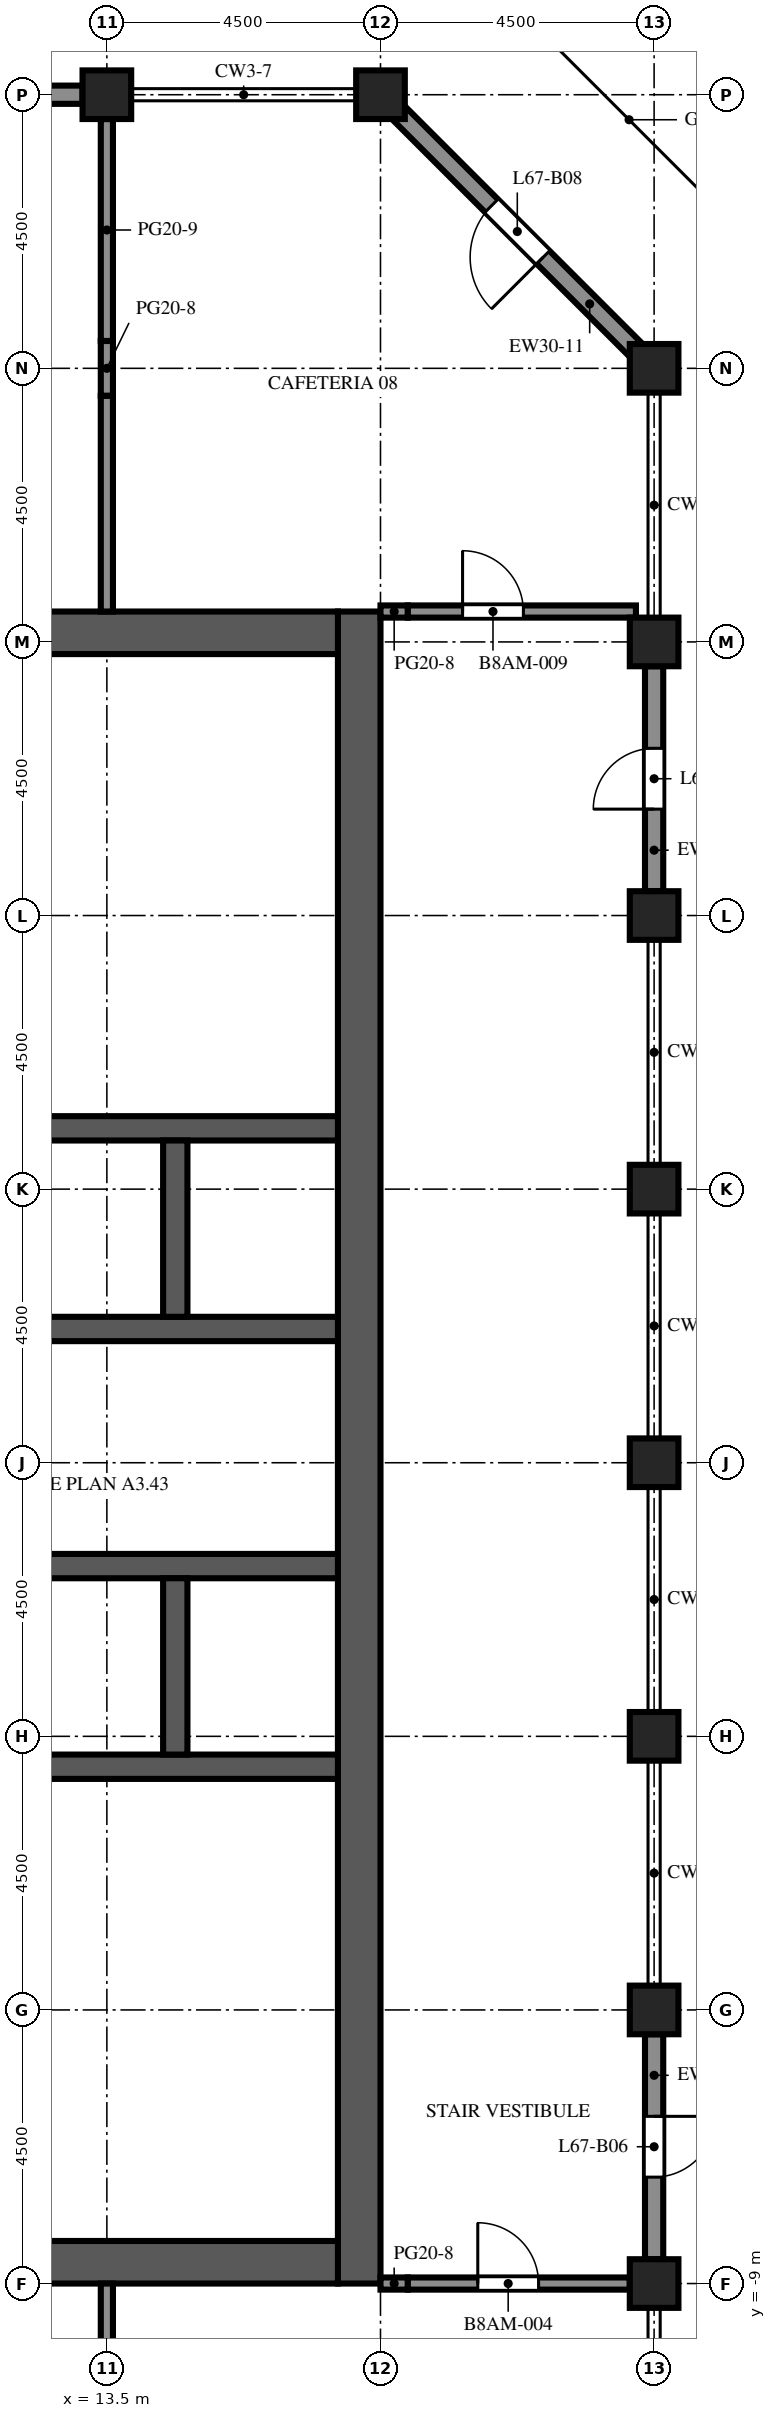
"""IFC4 building model, lengths in metres.
Left out: names, types, materials, properties, quantities, classifications, styles, units other than length and angle.
Written with IfcOpenShell. Run it as: python <this file> out.ifc"""

import sys

from ifc_helpers import new_model, si_unit, direction, frame, frame_2d, origin, origin_2d, place, context, subcontext, project, spatial, rectangle, extrude, element, fill, save


model = new_model("IFC4")
c1 = context("Model", 3, precision=1e-05, world=origin(), true_north=direction((0.0, 1.0)))
c2 = subcontext(c1, "Body", "Model", "MODEL_VIEW")
j1 = project(units=[si_unit("LENGTHUNIT", "METRE"), si_unit("PLANEANGLEUNIT", "RADIAN")], contexts=[c1])
p1 = place(None, origin())
s1 = spatial("IfcSite", under=j1, at=p1, CompositionType="ELEMENT")
p2 = place(p1, origin())
s2 = spatial("IfcBuilding", under=s1, at=p2, CompositionType="ELEMENT")
p3 = place(p2, frame((0.0, 0.0, 295.0)))
s3 = spatial("IfcBuildingStorey", under=s2, at=p3, CompositionType="ELEMENT", Elevation=295.0)
p4 = place(p3, frame((13.5, 27.0, 0.0), z_axis=(0.0, 0.0, 1.0), x_axis=(1.0, 0.0, 0.0)))
e1 = element("IfcColumn", 1, at=p4, inside=s3, PredefinedType="COLUMN", context=c2, shape_type="SweptSolid", body=[
    extrude(rectangle(XDim=0.8, YDim=0.8, at=origin_2d()), origin(), (0.0, 0.0, 1.0), 6.0),
])
p5 = place(p3, frame((18.0, 27.0, 0.0), z_axis=(0.0, 0.0, 1.0), x_axis=(1.0, 0.0, 0.0)))
e2 = element("IfcColumn", 2, at=p5, inside=s3, PredefinedType="COLUMN", context=c2, shape_type="SweptSolid", body=[
    extrude(rectangle(XDim=0.8, YDim=0.8, at=origin_2d()), origin(), (0.0, 0.0, 1.0), 3.6),
])
for number, where, z_axis, x_axis in (
    (3, (22.5, -9.0, 0.0), (0.0, 0.0, 1.0), (1.0, 0.0, 0.0)),
    (4, (22.5, -4.5, 0.0), (0.0, 0.0, 1.0), (1.0, 0.0, 0.0)),
    (5, (22.5, 0.0, 0.0), (0.0, 0.0, 1.0), (1.0, 0.0, 0.0)),
    (6, (22.5, 4.5, 0.0), (0.0, 0.0, 1.0), (1.0, 0.0, 0.0)),
    (7, (22.5, 9.0, 0.0), (0.0, 0.0, 1.0), (1.0, 0.0, 0.0)),
    (8, (22.5, 13.5, 0.0), (0.0, 0.0, 1.0), (1.0, 0.0, 0.0)),
    (9, (22.5, 18.0, 0.0), (0.0, 0.0, 1.0), (1.0, 0.0, 0.0)),
    (10, (22.5, 22.5, 0.0), (0.0, 0.0, 1.0), (1.0, 0.0, 0.0)),
):
    element("IfcColumn", number, at=place(p3, frame(where, z_axis=z_axis, x_axis=x_axis)), inside=s3, PredefinedType="COLUMN", context=c2, shape_type="SweptSolid", body=[
        extrude(rectangle(XDim=0.8, YDim=0.8, at=origin_2d()), origin(), (0.0, 0.0, 1.0), 6.0),
    ])
p6 = place(p3, frame((17.65, -9.0, 0.0), z_axis=(0.0, 0.0, 1.0), x_axis=(0.0, 1.0, 0.0)))
e11 = element("IfcWall", 11, at=p6, inside=s3, PredefinedType="SHEAR", context=c2, shape_type="SweptSolid", body=[
    extrude(rectangle(XDim=27.5, YDim=0.7, at=frame_2d((13.75, 0.0))), origin(), (0.0, 0.0, 1.0), 6.0),
])
p7 = place(p6, frame((12.55, 0.0, 0.0)))
e12 = element("IfcOpeningElement", 12, at=p7, cuts=e11, PredefinedType="OPENING", context=c2, shape_type="SweptSolid", body=[
    extrude(rectangle(XDim=2.4, YDim=2.4, at=frame_2d((1.2, 1.2))), frame((0.0, 0.36, 0.0), z_axis=(0.0, -1.0, 0.0), x_axis=(1.0, 0.0, 0.0)), (0.0, 0.0, 1.0), 0.72),
])
p8 = place(p6, frame((6.825, 0.0, 0.0)))
e13 = element("IfcOpeningElement", 13, at=p8, cuts=e11, PredefinedType="OPENING", context=c2, shape_type="SweptSolid", body=[
    extrude(rectangle(XDim=1.2, YDim=2.1, at=frame_2d((0.6, 1.05))), frame((0.0, 0.36, 0.0), z_axis=(0.0, -1.0, 0.0), x_axis=(1.0, 0.0, 0.0)), (0.0, 0.0, 1.0), 0.72),
])
p9 = place(p6, frame((19.475, 0.0, 0.0)))
e14 = element("IfcOpeningElement", 14, at=p9, cuts=e11, PredefinedType="OPENING", context=c2, shape_type="SweptSolid", body=[
    extrude(rectangle(XDim=1.2, YDim=2.1, at=frame_2d((0.6, 1.05))), frame((0.0, 0.36, 0.0), z_axis=(0.0, -1.0, 0.0), x_axis=(1.0, 0.0, 0.0)), (0.0, 0.0, 1.0), 0.72),
])
for number, where, z_axis, x_axis in (
    (15, (6.7, -8.65, 0.0), (0.0, 0.0, 1.0), (1.0, 0.0, 0.0)),
    (16, (6.7, 18.15, 0.0), (0.0, 0.0, 1.0), (1.0, 0.0, 0.0)),
):
    element("IfcWall", number, at=place(p3, frame(where, z_axis=z_axis, x_axis=x_axis)), inside=s3, PredefinedType="SHEAR", context=c2, shape_type="SweptSolid", body=[
        extrude(rectangle(XDim=10.6, YDim=0.7, at=frame_2d((5.3, 0.0))), origin(), (0.0, 0.0, 1.0), 6.0),
    ])
p10 = place(p3, frame((6.7, -0.5, 0.0), z_axis=(0.0, 0.0, 1.0), x_axis=(1.0, 0.0, 0.0)))
e17 = element("IfcWall", 17, at=p10, inside=s3, PredefinedType="SHEAR", context=c2, shape_type="SweptSolid", body=[
    extrude(rectangle(XDim=10.6, YDim=0.4, at=frame_2d((5.3, 0.0))), origin(), (0.0, 0.0, 1.0), 6.0),
])
p11 = place(p3, frame((6.7, 2.8, 0.0), z_axis=(0.0, 0.0, 1.0), x_axis=(1.0, 0.0, 0.0)))
e18 = element("IfcWall", 18, at=p11, inside=s3, PredefinedType="SHEAR", context=c2, shape_type="SweptSolid", body=[
    extrude(rectangle(XDim=10.6, YDim=0.4, at=frame_2d((5.3, 0.0))), origin(), (0.0, 0.0, 1.0), 6.0),
])
p12 = place(p11, frame((0.688, 0.0, 0.0)))
e19 = element("IfcOpeningElement", 19, at=p12, cuts=e18, PredefinedType="OPENING", context=c2, shape_type="SweptSolid", body=[
    extrude(rectangle(XDim=1.1, YDim=2.1, at=frame_2d((0.55, 1.05))), frame((0.0, 0.21, 0.0), z_axis=(0.0, -1.0, 0.0), x_axis=(1.0, 0.0, 0.0)), (0.0, 0.0, 1.0), 0.42),
])
p13 = place(p11, frame((3.438, 0.0, 0.0)))
e20 = element("IfcOpeningElement", 20, at=p13, cuts=e18, PredefinedType="OPENING", context=c2, shape_type="SweptSolid", body=[
    extrude(rectangle(XDim=1.1, YDim=2.1, at=frame_2d((0.55, 1.05))), frame((0.0, 0.21, 0.0), z_axis=(0.0, -1.0, 0.0), x_axis=(1.0, 0.0, 0.0)), (0.0, 0.0, 1.0), 0.42),
])
p14 = place(p11, frame((6.113, 0.0, 0.0)))
e21 = element("IfcOpeningElement", 21, at=p14, cuts=e18, PredefinedType="OPENING", context=c2, shape_type="SweptSolid", body=[
    extrude(rectangle(XDim=1.0, YDim=2.1, at=frame_2d((0.5, 1.05))), frame((0.0, 0.21, 0.0), z_axis=(0.0, -1.0, 0.0), x_axis=(1.0, 0.0, 0.0)), (0.0, 0.0, 1.0), 0.42),
])
p15 = place(p11, frame((8.863, 0.0, 0.0)))
e22 = element("IfcOpeningElement", 22, at=p15, cuts=e18, PredefinedType="OPENING", context=c2, shape_type="SweptSolid", body=[
    extrude(rectangle(XDim=1.0, YDim=2.1, at=frame_2d((0.5, 1.05))), frame((0.0, 0.21, 0.0), z_axis=(0.0, -1.0, 0.0), x_axis=(1.0, 0.0, 0.0)), (0.0, 0.0, 1.0), 0.42),
])
p16 = place(p3, frame((6.7, 6.7, 0.0), z_axis=(0.0, 0.0, 1.0), x_axis=(1.0, 0.0, 0.0)))
e23 = element("IfcWall", 23, at=p16, inside=s3, PredefinedType="SHEAR", context=c2, shape_type="SweptSolid", body=[
    extrude(rectangle(XDim=10.6, YDim=0.4, at=frame_2d((5.3, 0.0))), origin(), (0.0, 0.0, 1.0), 6.0),
])
p17 = place(p16, frame((3.438, 0.0, 0.0)))
e24 = element("IfcOpeningElement", 24, at=p17, cuts=e23, PredefinedType="OPENING", context=c2, shape_type="SweptSolid", body=[
    extrude(rectangle(XDim=1.1, YDim=2.1, at=frame_2d((0.55, 1.05))), frame((0.0, 0.21, 0.0), z_axis=(0.0, -1.0, 0.0), x_axis=(1.0, 0.0, 0.0)), (0.0, 0.0, 1.0), 0.42),
])
p18 = place(p16, frame((6.062, 0.0, 0.0)))
e25 = element("IfcOpeningElement", 25, at=p18, cuts=e23, PredefinedType="OPENING", context=c2, shape_type="SweptSolid", body=[
    extrude(rectangle(XDim=1.1, YDim=2.1, at=frame_2d((0.55, 1.05))), frame((0.0, 0.21, 0.0), z_axis=(0.0, -1.0, 0.0), x_axis=(1.0, 0.0, 0.0)), (0.0, 0.0, 1.0), 0.42),
])
p19 = place(p16, frame((8.812, 0.0, 0.0)))
e26 = element("IfcOpeningElement", 26, at=p19, cuts=e23, PredefinedType="OPENING", context=c2, shape_type="SweptSolid", body=[
    extrude(rectangle(XDim=1.1, YDim=2.1, at=frame_2d((0.55, 1.05))), frame((0.0, 0.21, 0.0), z_axis=(0.0, -1.0, 0.0), x_axis=(1.0, 0.0, 0.0)), (0.0, 0.0, 1.0), 0.42),
])
p20 = place(p16, frame((0.738, 0.0, 0.0)))
e27 = element("IfcOpeningElement", 27, at=p20, cuts=e23, PredefinedType="OPENING", context=c2, shape_type="SweptSolid", body=[
    extrude(rectangle(XDim=1.0, YDim=2.1, at=frame_2d((0.5, 1.05))), frame((0.0, 0.21, 0.0), z_axis=(0.0, -1.0, 0.0), x_axis=(1.0, 0.0, 0.0)), (0.0, 0.0, 1.0), 0.42),
])
p21 = place(p3, frame((6.7, 10.0, 0.0), z_axis=(0.0, 0.0, 1.0), x_axis=(1.0, 0.0, 0.0)))
e28 = element("IfcWall", 28, at=p21, inside=s3, PredefinedType="SHEAR", context=c2, shape_type="SweptSolid", body=[
    extrude(rectangle(XDim=10.6, YDim=0.4, at=frame_2d((5.3, 0.0))), origin(), (0.0, 0.0, 1.0), 6.0),
])
for number, where, z_axis, x_axis in (
    (29, (14.625, -0.3, 0.0), (0.0, 0.0, 1.0), (0.0, 1.0, 0.0)),
    (30, (14.625, 6.9, 0.0), (0.0, 0.0, 1.0), (0.0, 1.0, 0.0)),
):
    element("IfcWall", number, at=place(p3, frame(where, z_axis=z_axis, x_axis=x_axis)), inside=s3, PredefinedType="SHEAR", context=c2, shape_type="SweptSolid", body=[
        extrude(rectangle(XDim=2.9, YDim=0.4, at=frame_2d((1.45, 0.0))), origin(), (0.0, 0.0, 1.0), 6.0),
    ])
p22 = place(p3, frame((22.5, -4.9, 0.0), z_axis=(0.0, 0.0, 1.0), x_axis=(0.0, -1.0, 0.0)))
e31 = element("IfcWall", 31, at=p22, inside=s3, PredefinedType="SOLIDWALL", context=c2, shape_type="SweptSolid", body=[
    extrude(rectangle(XDim=3.7, YDim=0.3, at=frame_2d((1.85, 0.0))), origin(), (0.0, 0.0, 1.0), 4.6),
])
p23 = place(p22, frame((1.35, 0.0, 0.0)))
e32 = element("IfcOpeningElement", 32, at=p23, cuts=e31, PredefinedType="OPENING", context=c2, shape_type="SweptSolid", body=[
    extrude(rectangle(XDim=1.0, YDim=2.2, at=frame_2d((0.5, 1.1))), frame((0.0, 0.16, 0.0), z_axis=(0.0, -1.0, 0.0), x_axis=(1.0, 0.0, 0.0)), (0.0, 0.0, 1.0), 0.32),
])
p24 = place(p3, frame((22.5, 17.6, 0.0), z_axis=(0.0, 0.0, 1.0), x_axis=(0.0, -1.0, 0.0)))
e33 = element("IfcWall", 33, at=p24, inside=s3, PredefinedType="SOLIDWALL", context=c2, shape_type="SweptSolid", body=[
    extrude(rectangle(XDim=3.7, YDim=0.3, at=frame_2d((1.85, 0.0))), origin(), (0.0, 0.0, 1.0), 4.6),
])
p25 = place(p24, frame((1.35, 0.0, 0.0)))
e34 = element("IfcOpeningElement", 34, at=p25, cuts=e33, PredefinedType="OPENING", context=c2, shape_type="SweptSolid", body=[
    extrude(rectangle(XDim=1.0, YDim=2.2, at=frame_2d((0.5, 1.1))), frame((0.0, 0.16, 0.0), z_axis=(0.0, -1.0, 0.0), x_axis=(1.0, 0.0, 0.0)), (0.0, 0.0, 1.0), 0.32),
])
p26 = place(p3, frame((18.294, 26.706, 0.0), z_axis=(0.0, 0.0, 1.0), x_axis=(0.707106781187, -0.707106781187, 0.0)))
e35 = element("IfcWall", 35, at=p26, inside=s3, PredefinedType="SOLIDWALL", context=c2, shape_type="SweptSolid", body=[
    extrude(rectangle(XDim=5.532, YDim=0.3, at=frame_2d((2.766, 0.0))), origin(), (0.0, 0.0, 1.0), 3.6),
])
p27 = place(p26, frame((2.166, 0.0, 0.0)))
e36 = element("IfcOpeningElement", 36, at=p27, cuts=e35, PredefinedType="OPENING", context=c2, shape_type="SweptSolid", body=[
    extrude(rectangle(XDim=1.2, YDim=2.2, at=frame_2d((0.6, 1.1))), frame((0.0, 0.16, 0.0), z_axis=(0.0, -1.0, 0.0), x_axis=(1.0, 0.0, 0.0)), (0.0, 0.0, 1.0), 0.32),
])
p28 = place(p3, frame((9.4, 27.0, 0.0), z_axis=(0.0, 0.0, 1.0), x_axis=(1.0, 0.0, 0.0)))
e37 = element("IfcWall", 37, at=p28, inside=s3, PredefinedType="SOLIDWALL", context=c2, shape_type="SweptSolid", body=[
    extrude(rectangle(XDim=3.7, YDim=0.3, at=frame_2d((1.85, 0.0))), origin(), (0.0, 0.0, 1.0), 4.6),
])
p29 = place(p28, frame((1.35, 0.0, 0.0)))
e38 = element("IfcOpeningElement", 38, at=p29, cuts=e37, PredefinedType="OPENING", context=c2, shape_type="SweptSolid", body=[
    extrude(rectangle(XDim=1.0, YDim=2.2, at=frame_2d((0.5, 1.1))), frame((0.0, 0.16, 0.0), z_axis=(0.0, -1.0, 0.0), x_axis=(1.0, 0.0, 0.0)), (0.0, 0.0, 1.0), 0.32),
])
p30 = place(p3, frame((13.5, -13.05, 0.0), z_axis=(0.0, 0.0, 1.0), x_axis=(0.0, 1.0, 0.0)))
e39 = element("IfcWall", 39, at=p30, inside=s3, PredefinedType="PARTITIONING", context=c2, shape_type="SweptSolid", body=[
    extrude(rectangle(XDim=4.05, YDim=0.2, at=frame_2d((2.025, 0.0))), origin(), (0.0, 0.0, 1.0), 5.4),
])
p31 = place(p3, frame((13.5, 18.5, 0.0), z_axis=(0.0, 0.0, 1.0), x_axis=(0.0, 1.0, 0.0)))
e40 = element("IfcWall", 40, at=p31, inside=s3, PredefinedType="PARTITIONING", context=c2, shape_type="SweptSolid", body=[
    extrude(rectangle(XDim=3.55, YDim=0.2, at=frame_2d((1.775, 0.0))), origin(), (0.0, 0.0, 1.0), 5.4),
])
p32 = place(p3, frame((13.5, 22.05, 0.0), z_axis=(0.0, 0.0, 1.0), x_axis=(0.0, 1.0, 0.0)))
e41 = element("IfcWall", 41, at=p32, inside=s3, PredefinedType="PARTITIONING", context=c2, shape_type="SweptSolid", body=[
    extrude(rectangle(XDim=0.9, YDim=0.2, at=frame_2d((0.45, 0.0))), origin(), (0.0, 0.0, 1.0), 3.57),
])
p33 = place(p3, frame((13.5, 22.95, 0.0), z_axis=(0.0, 0.0, 1.0), x_axis=(0.0, 1.0, 0.0)))
e42 = element("IfcWall", 42, at=p33, inside=s3, PredefinedType="PARTITIONING", context=c2, shape_type="SweptSolid", body=[
    extrude(rectangle(XDim=3.65, YDim=0.2, at=frame_2d((1.825, 0.0))), origin(), (0.0, 0.0, 1.0), 4.77),
])
p34 = place(p3, frame((18.0, -9.0, 0.0), z_axis=(0.0, 0.0, 1.0), x_axis=(1.0, 0.0, 0.0)))
e43 = element("IfcWall", 43, at=p34, inside=s3, PredefinedType="PARTITIONING", context=c2, shape_type="SweptSolid", body=[
    extrude(rectangle(XDim=0.45, YDim=0.2, at=frame_2d((0.225, 0.0))), origin(), (0.0, 0.0, 1.0), 3.57),
])
p35 = place(p3, frame((22.1, -9.0, 0.0), z_axis=(0.0, 0.0, 1.0), x_axis=(-1.0, 0.0, 0.0)))
e44 = element("IfcWall", 44, at=p35, inside=s3, PredefinedType="PARTITIONING", context=c2, shape_type="SweptSolid", body=[
    extrude(rectangle(XDim=3.65, YDim=0.2, at=frame_2d((1.825, 0.0))), origin(), (0.0, 0.0, 1.0), 5.4),
])
p36 = place(p35, frame((1.5, 0.0, 0.0)))
e45 = element("IfcOpeningElement", 45, at=p36, cuts=e44, PredefinedType="OPENING", context=c2, shape_type="SweptSolid", body=[
    extrude(rectangle(XDim=1.0, YDim=2.1, at=frame_2d((0.5, 1.05))), frame((0.0, 0.11, 0.0), z_axis=(0.0, -1.0, 0.0), x_axis=(1.0, 0.0, 0.0)), (0.0, 0.0, 1.0), 0.22),
])
p37 = place(p3, frame((18.0, 18.5, 0.0), z_axis=(0.0, 0.0, 1.0), x_axis=(1.0, 0.0, 0.0)))
e46 = element("IfcWall", 46, at=p37, inside=s3, PredefinedType="PARTITIONING", context=c2, shape_type="SweptSolid", body=[
    extrude(rectangle(XDim=0.45, YDim=0.2, at=frame_2d((0.225, 0.0))), origin(), (0.0, 0.0, 1.0), 3.57),
])
p38 = place(p3, frame((18.45, 18.5, 0.0), z_axis=(0.0, 0.0, 1.0), x_axis=(1.0, 0.0, 0.0)))
e47 = element("IfcWall", 47, at=p38, inside=s3, PredefinedType="PARTITIONING", context=c2, shape_type="SweptSolid", body=[
    extrude(rectangle(XDim=3.751, YDim=0.2, at=frame_2d((1.875, 0.0))), origin(), (0.0, 0.0, 1.0), 5.4),
])
p39 = place(p38, frame((0.9, 0.0, 0.0)))
e48 = element("IfcOpeningElement", 48, at=p39, cuts=e47, PredefinedType="OPENING", context=c2, shape_type="SweptSolid", body=[
    extrude(rectangle(XDim=1.0, YDim=2.1, at=frame_2d((0.5, 1.05))), frame((0.0, 0.11, 0.0), z_axis=(0.0, -1.0, 0.0), x_axis=(1.0, 0.0, 0.0)), (0.0, 0.0, 1.0), 0.22),
])
p40 = place(p23, origin())
e49 = element("IfcDoor", 49, at=p40, inside=s3, OperationType="SINGLE_SWING_LEFT", PredefinedType="DOOR", context=c2, shape_type="SweptSolid", body=[
    extrude(rectangle(XDim=1.0, YDim=2.2, at=frame_2d((0.5, 1.1))), frame((0.0, 0.025, 0.0), z_axis=(0.0, -1.0, 0.0), x_axis=(1.0, 0.0, 0.0)), (0.0, 0.0, 1.0), 0.05),
])
fill(e32, e49)
p41 = place(p25, origin())
e50 = element("IfcDoor", 50, at=p41, inside=s3, OperationType="SINGLE_SWING_RIGHT", PredefinedType="DOOR", context=c2, shape_type="SweptSolid", body=[
    extrude(rectangle(XDim=1.0, YDim=2.2, at=frame_2d((0.5, 1.1))), frame((0.0, 0.025, 0.0), z_axis=(0.0, -1.0, 0.0), x_axis=(1.0, 0.0, 0.0)), (0.0, 0.0, 1.0), 0.05),
])
fill(e34, e50)
p42 = place(p27, origin())
e51 = element("IfcDoor", 51, at=p42, inside=s3, OperationType="SINGLE_SWING_RIGHT", PredefinedType="DOOR", context=c2, shape_type="SweptSolid", body=[
    extrude(rectangle(XDim=1.2, YDim=2.2, at=frame_2d((0.6, 1.1))), frame((0.0, 0.025, 0.0), z_axis=(0.0, -1.0, 0.0), x_axis=(1.0, 0.0, 0.0)), (0.0, 0.0, 1.0), 0.05),
])
fill(e36, e51)
p43 = place(p18, origin())
e52 = element("IfcDoor", 52, at=p43, inside=s3, OperationType="DOUBLE_DOOR_SLIDING", PredefinedType="DOOR", context=c2, shape_type="SweptSolid", body=[
    extrude(rectangle(XDim=1.1, YDim=2.1, at=frame_2d((0.55, 1.05))), frame((0.0, 0.025, 0.0), z_axis=(0.0, -1.0, 0.0), x_axis=(1.0, 0.0, 0.0)), (0.0, 0.0, 1.0), 0.05),
])
fill(e25, e52)
p44 = place(p19, origin())
e53 = element("IfcDoor", 53, at=p44, inside=s3, OperationType="DOUBLE_DOOR_SLIDING", PredefinedType="DOOR", context=c2, shape_type="SweptSolid", body=[
    extrude(rectangle(XDim=1.1, YDim=2.1, at=frame_2d((0.55, 1.05))), frame((0.0, 0.025, 0.0), z_axis=(0.0, -1.0, 0.0), x_axis=(1.0, 0.0, 0.0)), (0.0, 0.0, 1.0), 0.05),
])
fill(e26, e53)
p45 = place(p7, origin())
e54 = element("IfcDoor", 54, at=p45, inside=s3, OperationType="DOUBLE_DOOR_DOUBLE_SWING", PredefinedType="DOOR", context=c2, shape_type="SweptSolid", body=[
    extrude(rectangle(XDim=2.4, YDim=2.4, at=frame_2d((1.2, 1.2))), frame((0.0, 0.025, 0.0), z_axis=(0.0, -1.0, 0.0), x_axis=(1.0, 0.0, 0.0)), (0.0, 0.0, 1.0), 0.05),
])
fill(e12, e54)
p46 = place(p8, frame((1.2, 0.0, 0.0), z_axis=(0.0, 0.0, 1.0), x_axis=(-1.0, 0.0, 0.0)))
e55 = element("IfcDoor", 55, at=p46, inside=s3, OperationType="SINGLE_SWING_LEFT", PredefinedType="DOOR", context=c2, shape_type="SweptSolid", body=[
    extrude(rectangle(XDim=1.2, YDim=2.1, at=frame_2d((0.6, 1.05))), frame((0.0, 0.025, 0.0), z_axis=(0.0, -1.0, 0.0), x_axis=(1.0, 0.0, 0.0)), (0.0, 0.0, 1.0), 0.05),
])
fill(e13, e55)
p47 = place(p9, frame((1.2, 0.0, 0.0), z_axis=(0.0, 0.0, 1.0), x_axis=(-1.0, 0.0, 0.0)))
e56 = element("IfcDoor", 56, at=p47, inside=s3, OperationType="SINGLE_SWING_LEFT", PredefinedType="DOOR", context=c2, shape_type="SweptSolid", body=[
    extrude(rectangle(XDim=1.2, YDim=2.1, at=frame_2d((0.6, 1.05))), frame((0.0, 0.025, 0.0), z_axis=(0.0, -1.0, 0.0), x_axis=(1.0, 0.0, 0.0)), (0.0, 0.0, 1.0), 0.05),
])
fill(e14, e56)
p48 = place(p14, origin())
e57 = element("IfcDoor", 57, at=p48, inside=s3, OperationType="SINGLE_SWING_LEFT", PredefinedType="DOOR", context=c2, shape_type="SweptSolid", body=[
    extrude(rectangle(XDim=1.0, YDim=2.1, at=frame_2d((0.5, 1.05))), frame((0.0, 0.025, 0.0), z_axis=(0.0, -1.0, 0.0), x_axis=(1.0, 0.0, 0.0)), (0.0, 0.0, 1.0), 0.05),
])
fill(e21, e57)
p49 = place(p15, origin())
e58 = element("IfcDoor", 58, at=p49, inside=s3, OperationType="SINGLE_SWING_RIGHT", PredefinedType="DOOR", context=c2, shape_type="SweptSolid", body=[
    extrude(rectangle(XDim=1.0, YDim=2.1, at=frame_2d((0.5, 1.05))), frame((0.0, 0.025, 0.0), z_axis=(0.0, -1.0, 0.0), x_axis=(1.0, 0.0, 0.0)), (0.0, 0.0, 1.0), 0.05),
])
fill(e22, e58)
p50 = place(p36, origin())
e59 = element("IfcDoor", 59, at=p50, inside=s3, OperationType="SINGLE_SWING_RIGHT", PredefinedType="DOOR", context=c2, shape_type="SweptSolid", body=[
    extrude(rectangle(XDim=1.0, YDim=2.1, at=frame_2d((0.5, 1.05))), frame((0.0, 0.025, 0.0), z_axis=(0.0, -1.0, 0.0), x_axis=(1.0, 0.0, 0.0)), (0.0, 0.0, 1.0), 0.05),
])
fill(e45, e59)
p51 = place(p39, origin())
e60 = element("IfcDoor", 60, at=p51, inside=s3, OperationType="SINGLE_SWING_LEFT", PredefinedType="DOOR", context=c2, shape_type="SweptSolid", body=[
    extrude(rectangle(XDim=1.0, YDim=2.1, at=frame_2d((0.5, 1.05))), frame((0.0, 0.025, 0.0), z_axis=(0.0, -1.0, 0.0), x_axis=(1.0, 0.0, 0.0)), (0.0, 0.0, 1.0), 0.05),
])
fill(e48, e60)
save(model, sys.argv[1])
